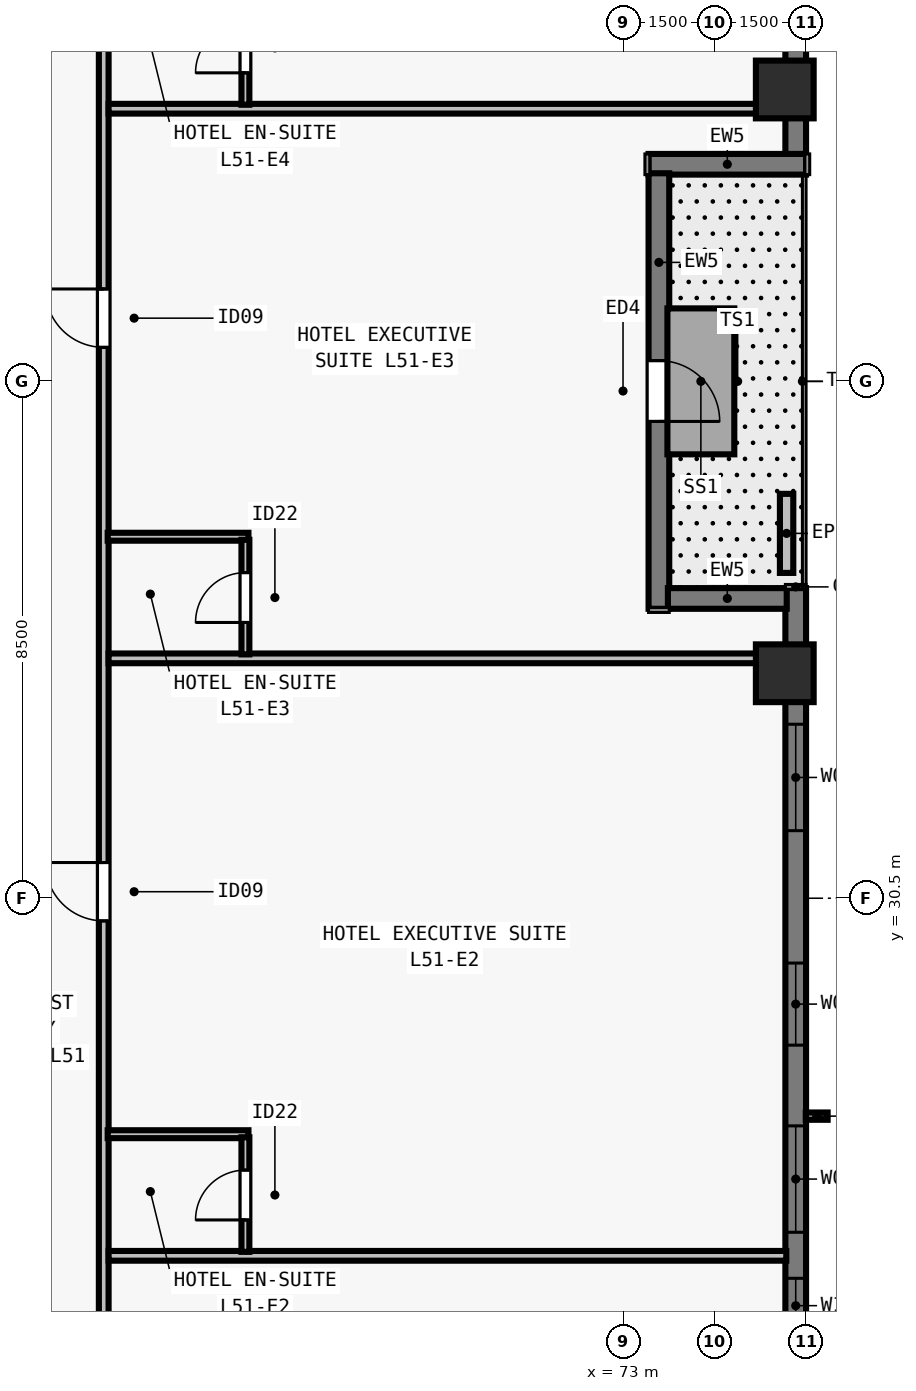
"""IFC4 building model, lengths in metres.
Left out: names, types, materials, properties, quantities, classifications, styles, units other than length and angle.
Written with IfcOpenShell. Run it as: python <this file> out.ifc"""

import sys

from ifc_helpers import new_model, si_unit, direction, frame, frame_2d, origin, origin_2d, place, context, subcontext, project, spatial, rectangle, extrude, element, fill, save


model = new_model("IFC4")
c1 = context("Model", 3, precision=1e-05, world=origin(), true_north=direction((0.0, 1.0)))
c2 = subcontext(c1, "Body", "Model", "MODEL_VIEW")
j1 = project(units=[si_unit("LENGTHUNIT", "METRE"), si_unit("PLANEANGLEUNIT", "RADIAN")], contexts=[c1])
p1 = place(None, origin())
s1 = spatial("IfcSite", under=j1, at=p1, CompositionType="ELEMENT")
p2 = place(p1, origin())
s2 = spatial("IfcBuilding", under=s1, at=p2, CompositionType="ELEMENT")
p3 = place(p2, frame((0.0, 0.0, 186.5)))
s3 = spatial("IfcBuildingStorey", under=s2, at=p3, CompositionType="ELEMENT", Elevation=186.5)
for number, where, z_axis, x_axis in (
    (1, (75.65, 34.2, 0.0), (0.0, 0.0, 1.0), (0.0, 1.0, 0.0)),
    (2, (75.65, 43.8, 0.0), (0.0, 0.0, 1.0), (0.0, 1.0, 0.0)),
):
    element("IfcColumn", number, at=place(p3, frame(where, z_axis=z_axis, x_axis=x_axis)), inside=s3, PredefinedType="COLUMN", context=c2, shape_type="SweptSolid", body=[
        extrude(rectangle(XDim=0.95, YDim=0.95, at=origin_2d()), origin(), (0.0, 0.0, 1.0), 3.5),
    ])
p4 = place(p3, frame((75.83, 35.6, 0.0), z_axis=(0.0, 0.0, 1.0), x_axis=(0.0, -1.0, 0.0)))
e3 = element("IfcWall", 3, at=p4, inside=s3, PredefinedType="SOLIDWALL", context=c2, shape_type="SweptSolid", body=[
    extrude(rectangle(XDim=16.282, YDim=0.34, at=frame_2d((8.141, 0.0))), origin(), (0.0, 0.0, 1.0), 3.28),
])
p5 = place(p4, frame((2.239, 0.0, 0.8)))
e4 = element("IfcOpeningElement", 4, at=p5, cuts=e3, PredefinedType="OPENING", context=c2, shape_type="SweptSolid", body=[
    extrude(rectangle(XDim=1.75, YDim=1.66, at=frame_2d((0.875, 0.83))), frame((0.0, 0.18, 0.0), z_axis=(0.0, -1.0, 0.0), x_axis=(1.0, 0.0, 0.0)), (0.0, 0.0, 1.0), 0.36),
])
p6 = place(p4, frame((6.166, 0.0, 0.8)))
e5 = element("IfcOpeningElement", 5, at=p6, cuts=e3, PredefinedType="OPENING", context=c2, shape_type="SweptSolid", body=[
    extrude(rectangle(XDim=1.35, YDim=1.66, at=frame_2d((0.675, 0.83))), frame((0.0, 0.18, 0.0), z_axis=(0.0, -1.0, 0.0), x_axis=(1.0, 0.0, 0.0)), (0.0, 0.0, 1.0), 0.36),
])
p7 = place(p4, frame((8.843, 0.0, 0.8)))
e6 = element("IfcOpeningElement", 6, at=p7, cuts=e3, PredefinedType="OPENING", context=c2, shape_type="SweptSolid", body=[
    extrude(rectangle(XDim=1.75, YDim=1.66, at=frame_2d((0.875, 0.83))), frame((0.0, 0.18, 0.0), z_axis=(0.0, -1.0, 0.0), x_axis=(1.0, 0.0, 0.0)), (0.0, 0.0, 1.0), 0.36),
])
p8 = place(p4, frame((11.35, 0.0, 0.8)))
e7 = element("IfcOpeningElement", 7, at=p8, cuts=e3, PredefinedType="OPENING", context=c2, shape_type="SweptSolid", body=[
    extrude(rectangle(XDim=0.9, YDim=1.66, at=frame_2d((0.45, 0.83))), frame((0.0, 0.18, 0.0), z_axis=(0.0, -1.0, 0.0), x_axis=(1.0, 0.0, 0.0)), (0.0, 0.0, 1.0), 0.36),
])
p9 = place(p3, frame((75.83, 59.0, 0.0), z_axis=(0.0, 0.0, 1.0), x_axis=(0.0, -1.0, 0.0)))
e8 = element("IfcWall", 8, at=p9, inside=s3, PredefinedType="SOLIDWALL", context=c2, shape_type="SweptSolid", body=[
    extrude(rectangle(XDim=16.282, YDim=0.34, at=frame_2d((8.141, 0.0))), origin(), (0.0, 0.0, 1.0), 3.28),
])
p10 = place(p9, frame((6.089, 0.0, 0.8)))
e9 = element("IfcOpeningElement", 9, at=p10, cuts=e8, PredefinedType="OPENING", context=c2, shape_type="SweptSolid", body=[
    extrude(rectangle(XDim=1.75, YDim=1.66, at=frame_2d((0.875, 0.83))), frame((0.0, 0.18, 0.0), z_axis=(0.0, -1.0, 0.0), x_axis=(1.0, 0.0, 0.0)), (0.0, 0.0, 1.0), 0.36),
])
p11 = place(p9, frame((8.766, 0.0, 0.8)))
e10 = element("IfcOpeningElement", 10, at=p11, cuts=e8, PredefinedType="OPENING", context=c2, shape_type="SweptSolid", body=[
    extrude(rectangle(XDim=1.35, YDim=1.66, at=frame_2d((0.675, 0.83))), frame((0.0, 0.18, 0.0), z_axis=(0.0, -1.0, 0.0), x_axis=(1.0, 0.0, 0.0)), (0.0, 0.0, 1.0), 0.36),
])
p12 = place(p9, frame((12.293, 0.0, 0.8)))
e11 = element("IfcOpeningElement", 11, at=p12, cuts=e8, PredefinedType="OPENING", context=c2, shape_type="SweptSolid", body=[
    extrude(rectangle(XDim=1.75, YDim=1.66, at=frame_2d((0.875, 0.83))), frame((0.0, 0.18, 0.0), z_axis=(0.0, -1.0, 0.0), x_axis=(1.0, 0.0, 0.0)), (0.0, 0.0, 1.0), 0.36),
])
p13 = place(p3, frame((76.0, 42.57, 0.0), z_axis=(0.0, 0.0, 1.0), x_axis=(-1.0, 0.0, 0.0)))
e12 = element("IfcWall", 12, at=p13, inside=s3, PredefinedType="SOLIDWALL", context=c2, shape_type="SweptSolid", body=[
    extrude(rectangle(XDim=2.59, YDim=0.34, at=frame_2d((1.295, 0.0))), origin(), (0.0, 0.0, 1.0), 3.28),
])
p14 = place(p3, frame((73.58, 42.422, 0.0), z_axis=(0.0, 0.0, 1.0), x_axis=(0.0, -1.0, 0.0)))
e13 = element("IfcWall", 13, at=p14, inside=s3, PredefinedType="SOLIDWALL", context=c2, shape_type="SweptSolid", body=[
    extrude(rectangle(XDim=7.162, YDim=0.34, at=frame_2d((3.581, 0.0))), origin(), (0.0, 0.0, 1.0), 3.28),
])
p15 = place(p14, frame((3.081, 0.0, 0.0)))
e14 = element("IfcOpeningElement", 14, at=p15, cuts=e13, PredefinedType="OPENING", context=c2, shape_type="SweptSolid", body=[
    extrude(rectangle(XDim=1.0, YDim=2.15, at=frame_2d((0.5, 1.075))), frame((0.0, 0.18, 0.0), z_axis=(0.0, -1.0, 0.0), x_axis=(1.0, 0.0, 0.0)), (0.0, 0.0, 1.0), 0.36),
])
p16 = place(p3, frame((73.728, 35.43, 0.0), z_axis=(0.0, 0.0, 1.0), x_axis=(1.0, 0.0, 0.0)))
e15 = element("IfcWall", 15, at=p16, inside=s3, PredefinedType="SOLIDWALL", context=c2, shape_type="SweptSolid", body=[
    extrude(rectangle(XDim=1.954, YDim=0.34, at=frame_2d((0.977, 0.0))), origin(), (0.0, 0.0, 1.0), 3.28),
])
p17 = place(p3, frame((75.68, 35.85, 0.0), z_axis=(0.0, 0.0, 1.0), x_axis=(0.0, 1.0, 0.0)))
e16 = element("IfcWall", 16, at=p17, inside=s3, PredefinedType="PARAPET", context=c2, shape_type="SweptSolid", body=[
    extrude(rectangle(XDim=1.3, YDim=0.22, at=frame_2d((0.65, 0.0))), origin(), (0.0, 0.0, 1.0), 0.55),
])
p18 = place(p3, frame((64.45, 15.325, 0.0), z_axis=(0.0, 0.0, 1.0), x_axis=(0.0, 1.0, 0.0)))
e17 = element("IfcWall", 17, at=p18, inside=s3, PredefinedType="PARTITIONING", context=c2, shape_type="SweptSolid", body=[
    extrude(rectangle(XDim=47.35, YDim=0.16, at=frame_2d((23.675, 0.0))), origin(), (0.0, 0.0, 1.0), 2.555),
])
p19 = place(p18, frame((5.515, 0.0, 0.0)))
e18 = element("IfcOpeningElement", 18, at=p19, cuts=e17, PredefinedType="OPENING", context=c2, shape_type="SweptSolid", body=[
    extrude(rectangle(XDim=0.96, YDim=2.15, at=frame_2d((0.48, 1.075))), frame((0.0, 0.09, 0.0), z_axis=(0.0, -1.0, 0.0), x_axis=(1.0, 0.0, 0.0)), (0.0, 0.0, 1.0), 0.18),
])
p20 = place(p18, frame((14.802, 0.0, 0.0)))
e19 = element("IfcOpeningElement", 19, at=p20, cuts=e17, PredefinedType="OPENING", context=c2, shape_type="SweptSolid", body=[
    extrude(rectangle(XDim=0.96, YDim=2.15, at=frame_2d((0.48, 1.075))), frame((0.0, 0.09, 0.0), z_axis=(0.0, -1.0, 0.0), x_axis=(1.0, 0.0, 0.0)), (0.0, 0.0, 1.0), 0.18),
])
p21 = place(p18, frame((24.234, 0.0, 0.0)))
e20 = element("IfcOpeningElement", 20, at=p21, cuts=e17, PredefinedType="OPENING", context=c2, shape_type="SweptSolid", body=[
    extrude(rectangle(XDim=0.96, YDim=2.15, at=frame_2d((0.48, 1.075))), frame((0.0, 0.09, 0.0), z_axis=(0.0, -1.0, 0.0), x_axis=(1.0, 0.0, 0.0)), (0.0, 0.0, 1.0), 0.18),
])
p22 = place(p18, frame((33.666, 0.0, 0.0)))
e21 = element("IfcOpeningElement", 21, at=p22, cuts=e17, PredefinedType="OPENING", context=c2, shape_type="SweptSolid", body=[
    extrude(rectangle(XDim=0.96, YDim=2.15, at=frame_2d((0.48, 1.075))), frame((0.0, 0.09, 0.0), z_axis=(0.0, -1.0, 0.0), x_axis=(1.0, 0.0, 0.0)), (0.0, 0.0, 1.0), 0.18),
])
p23 = place(p18, frame((43.214, 0.0, 0.0)))
e22 = element("IfcOpeningElement", 22, at=p23, cuts=e17, PredefinedType="OPENING", context=c2, shape_type="SweptSolid", body=[
    extrude(rectangle(XDim=0.96, YDim=2.15, at=frame_2d((0.48, 1.075))), frame((0.0, 0.09, 0.0), z_axis=(0.0, -1.0, 0.0), x_axis=(1.0, 0.0, 0.0)), (0.0, 0.0, 1.0), 0.18),
])
p24 = place(p3, frame((64.53, 24.62, 0.0), z_axis=(0.0, 0.0, 1.0), x_axis=(1.0, 0.0, 0.0)))
e23 = element("IfcWall", 23, at=p24, inside=s3, PredefinedType="PARTITIONING", context=c2, shape_type="SweptSolid", body=[
    extrude(rectangle(XDim=11.145, YDim=0.16, at=frame_2d((5.573, 0.0))), origin(), (0.0, 0.0, 1.0), 2.896),
])
p25 = place(p3, frame((64.515, 26.62, 0.0), z_axis=(0.0, 0.0, 1.0), x_axis=(1.0, 0.0, 0.0)))
e24 = element("IfcWall", 24, at=p25, inside=s3, PredefinedType="PLUMBINGWALL", context=c2, shape_type="SweptSolid", body=[
    extrude(rectangle(XDim=2.315, YDim=0.13, at=frame_2d((1.158, 0.0))), origin(), (0.0, 0.0, 1.0), 2.896),
])
p26 = place(p3, frame((66.78, 24.685, 0.0), z_axis=(0.0, 0.0, 1.0), x_axis=(0.0, 1.0, 0.0)))
e25 = element("IfcWall", 25, at=p26, inside=s3, PredefinedType="PLUMBINGWALL", context=c2, shape_type="SweptSolid", body=[
    extrude(rectangle(XDim=1.885, YDim=0.13, at=frame_2d((0.942, 0.0))), origin(), (0.0, 0.0, 1.0), 3.28),
])
p27 = place(p26, frame((0.525, 0.0, 0.0)))
e26 = element("IfcOpeningElement", 26, at=p27, cuts=e25, PredefinedType="OPENING", context=c2, shape_type="SweptSolid", body=[
    extrude(rectangle(XDim=0.82, YDim=2.1, at=frame_2d((0.41, 1.05))), frame((0.0, 0.075, 0.0), z_axis=(0.0, -1.0, 0.0), x_axis=(1.0, 0.0, 0.0)), (0.0, 0.0, 1.0), 0.15),
])
p28 = place(p3, frame((64.53, 34.445, 0.0), z_axis=(0.0, 0.0, 1.0), x_axis=(1.0, 0.0, 0.0)))
e27 = element("IfcWall", 27, at=p28, inside=s3, PredefinedType="PARTITIONING", context=c2, shape_type="SweptSolid", body=[
    extrude(rectangle(XDim=11.145, YDim=0.16, at=frame_2d((5.573, 0.0))), origin(), (0.0, 0.0, 1.0), 3.28),
])
p29 = place(p3, frame((64.515, 36.445, 0.0), z_axis=(0.0, 0.0, 1.0), x_axis=(1.0, 0.0, 0.0)))
e28 = element("IfcWall", 28, at=p29, inside=s3, PredefinedType="PLUMBINGWALL", context=c2, shape_type="SweptSolid", body=[
    extrude(rectangle(XDim=2.315, YDim=0.13, at=frame_2d((1.158, 0.0))), origin(), (0.0, 0.0, 1.0), 3.28),
])
p30 = place(p3, frame((66.78, 34.51, 0.0), z_axis=(0.0, 0.0, 1.0), x_axis=(0.0, 1.0, 0.0)))
e29 = element("IfcWall", 29, at=p30, inside=s3, PredefinedType="PLUMBINGWALL", context=c2, shape_type="SweptSolid", body=[
    extrude(rectangle(XDim=1.885, YDim=0.13, at=frame_2d((0.942, 0.0))), origin(), (0.0, 0.0, 1.0), 3.28),
])
p31 = place(p30, frame((0.525, 0.0, 0.0)))
e30 = element("IfcOpeningElement", 30, at=p31, cuts=e29, PredefinedType="OPENING", context=c2, shape_type="SweptSolid", body=[
    extrude(rectangle(XDim=0.82, YDim=2.1, at=frame_2d((0.41, 1.05))), frame((0.0, 0.075, 0.0), z_axis=(0.0, -1.0, 0.0), x_axis=(1.0, 0.0, 0.0)), (0.0, 0.0, 1.0), 0.15),
])
p32 = place(p3, frame((64.53, 43.484, 0.0), z_axis=(0.0, 0.0, 1.0), x_axis=(1.0, 0.0, 0.0)))
e31 = element("IfcWall", 31, at=p32, inside=s3, PredefinedType="PARTITIONING", context=c2, shape_type="SweptSolid", body=[
    extrude(rectangle(XDim=11.145, YDim=0.16, at=frame_2d((5.573, 0.0))), origin(), (0.0, 0.0, 1.0), 3.28),
])
p33 = place(p3, frame((66.78, 43.549, 0.0), z_axis=(0.0, 0.0, 1.0), x_axis=(0.0, 1.0, 0.0)))
e32 = element("IfcWall", 32, at=p33, inside=s3, PredefinedType="PLUMBINGWALL", context=c2, shape_type="SweptSolid", body=[
    extrude(rectangle(XDim=1.885, YDim=0.13, at=frame_2d((0.942, 0.0))), origin(), (0.0, 0.0, 1.0), 3.28),
])
p34 = place(p33, frame((0.525, 0.0, 0.0)))
e33 = element("IfcOpeningElement", 33, at=p34, cuts=e32, PredefinedType="OPENING", context=c2, shape_type="SweptSolid", body=[
    extrude(rectangle(XDim=0.82, YDim=2.1, at=frame_2d((0.41, 1.05))), frame((0.0, 0.075, 0.0), z_axis=(0.0, -1.0, 0.0), x_axis=(1.0, 0.0, 0.0)), (0.0, 0.0, 1.0), 0.15),
])
p35 = place(p5, origin())
e34 = element("IfcWindow", 34, at=p35, inside=s3, PartitioningType="SINGLE_PANEL", PredefinedType="WINDOW", context=c2, shape_type="SweptSolid", body=[
    extrude(rectangle(XDim=1.75, YDim=1.66, at=frame_2d((0.875, 0.83))), frame((0.0, -0.05, 0.0), z_axis=(0.0, -1.0, 0.0), x_axis=(1.0, 0.0, 0.0)), (0.0, 0.0, 1.0), 0.06),
])
fill(e4, e34)
p36 = place(p6, origin())
e35 = element("IfcWindow", 35, at=p36, inside=s3, PartitioningType="SINGLE_PANEL", PredefinedType="WINDOW", context=c2, shape_type="SweptSolid", body=[
    extrude(rectangle(XDim=1.35, YDim=1.66, at=frame_2d((0.675, 0.83))), frame((0.0, -0.05, 0.0), z_axis=(0.0, -1.0, 0.0), x_axis=(1.0, 0.0, 0.0)), (0.0, 0.0, 1.0), 0.06),
])
fill(e5, e35)
p37 = place(p7, origin())
e36 = element("IfcWindow", 36, at=p37, inside=s3, PartitioningType="SINGLE_PANEL", PredefinedType="WINDOW", context=c2, shape_type="SweptSolid", body=[
    extrude(rectangle(XDim=1.75, YDim=1.66, at=frame_2d((0.875, 0.83))), frame((0.0, -0.05, 0.0), z_axis=(0.0, -1.0, 0.0), x_axis=(1.0, 0.0, 0.0)), (0.0, 0.0, 1.0), 0.06),
])
fill(e6, e36)
p38 = place(p15, origin())
e37 = element("IfcDoor", 37, at=p38, inside=s3, OperationType="SINGLE_SWING_RIGHT", PredefinedType="DOOR", context=c2, shape_type="SweptSolid", body=[
    extrude(rectangle(XDim=1.0, YDim=2.15, at=frame_2d((0.5, 1.075))), frame((0.0, 0.025, 0.0), z_axis=(0.0, -1.0, 0.0), x_axis=(1.0, 0.0, 0.0)), (0.0, 0.0, 1.0), 0.05),
])
fill(e14, e37)
p39 = place(p8, origin())
e38 = element("IfcWindow", 38, at=p39, inside=s3, PartitioningType="SINGLE_PANEL", PredefinedType="WINDOW", context=c2, shape_type="SweptSolid", body=[
    extrude(rectangle(XDim=0.9, YDim=1.66, at=frame_2d((0.45, 0.83))), frame((0.0, -0.04, 0.0), z_axis=(0.0, -1.0, 0.0), x_axis=(1.0, 0.0, 0.0)), (0.0, 0.0, 1.0), 0.06),
])
fill(e7, e38)
p40 = place(p27, origin())
e39 = element("IfcDoor", 39, at=p40, inside=s3, OperationType="SINGLE_SWING_LEFT", PredefinedType="DOOR", context=c2, shape_type="SweptSolid", body=[
    extrude(rectangle(XDim=0.82, YDim=2.1, at=frame_2d((0.41, 1.05))), frame((0.0, 0.025, 0.0), z_axis=(0.0, -1.0, 0.0), x_axis=(1.0, 0.0, 0.0)), (0.0, 0.0, 1.0), 0.05),
])
fill(e26, e39)
p41 = place(p20, origin())
e40 = element("IfcDoor", 40, at=p41, inside=s3, OperationType="SINGLE_SWING_RIGHT", PredefinedType="DOOR", context=c2, shape_type="SweptSolid", body=[
    extrude(rectangle(XDim=0.96, YDim=2.15, at=frame_2d((0.48, 1.075))), frame((0.0, 0.025, 0.0), z_axis=(0.0, -1.0, 0.0), x_axis=(1.0, 0.0, 0.0)), (0.0, 0.0, 1.0), 0.05),
])
fill(e19, e40)
p42 = place(p31, origin())
e41 = element("IfcDoor", 41, at=p42, inside=s3, OperationType="SINGLE_SWING_LEFT", PredefinedType="DOOR", context=c2, shape_type="SweptSolid", body=[
    extrude(rectangle(XDim=0.82, YDim=2.1, at=frame_2d((0.41, 1.05))), frame((0.0, 0.025, 0.0), z_axis=(0.0, -1.0, 0.0), x_axis=(1.0, 0.0, 0.0)), (0.0, 0.0, 1.0), 0.05),
])
fill(e30, e41)
p43 = place(p21, origin())
e42 = element("IfcDoor", 42, at=p43, inside=s3, OperationType="SINGLE_SWING_RIGHT", PredefinedType="DOOR", context=c2, shape_type="SweptSolid", body=[
    extrude(rectangle(XDim=0.96, YDim=2.15, at=frame_2d((0.48, 1.075))), frame((0.0, 0.025, 0.0), z_axis=(0.0, -1.0, 0.0), x_axis=(1.0, 0.0, 0.0)), (0.0, 0.0, 1.0), 0.05),
])
fill(e20, e42)
p44 = place(p34, origin())
e43 = element("IfcDoor", 43, at=p44, inside=s3, OperationType="SINGLE_SWING_LEFT", PredefinedType="DOOR", context=c2, shape_type="SweptSolid", body=[
    extrude(rectangle(XDim=0.82, YDim=2.1, at=frame_2d((0.41, 1.05))), frame((0.0, 0.025, 0.0), z_axis=(0.0, -1.0, 0.0), x_axis=(1.0, 0.0, 0.0)), (0.0, 0.0, 1.0), 0.05),
])
fill(e33, e43)
save(model, sys.argv[1])
